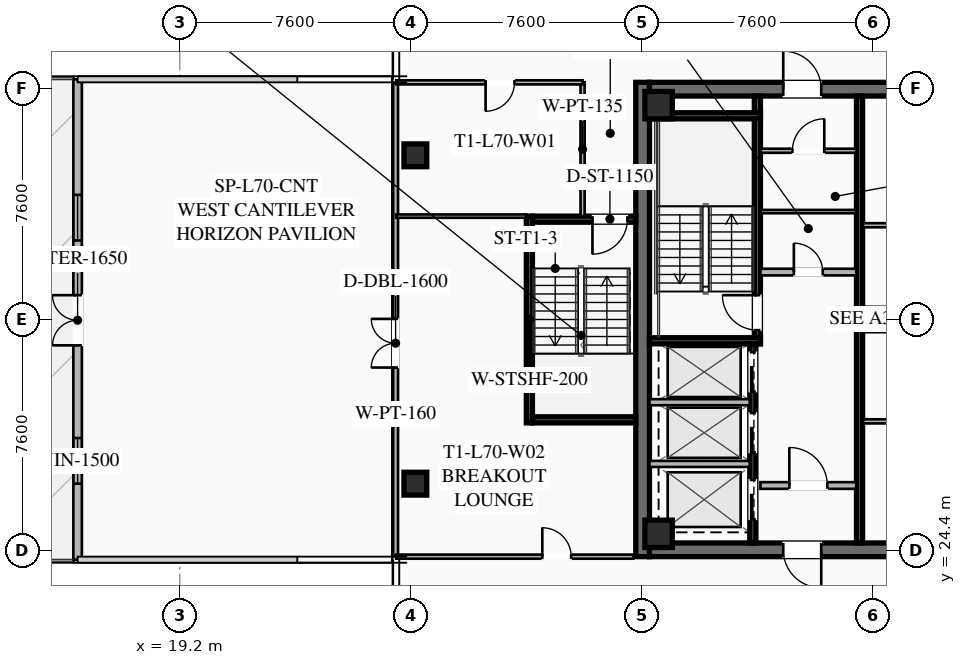
"""IFC4 building model, lengths in metres.
Left out: names, types, materials, properties, quantities, classifications, styles, units other than length and angle.
Written with IfcOpenShell. Run it as: python <this file> out.ifc"""

import sys

from ifc_helpers import new_model, si_unit, direction, frame, frame_2d, origin, origin_2d, place, context, subcontext, project, spatial, rectangle, hollow_rectangle, extrude, element, fill, save


model = new_model("IFC4")
c1 = context("Model", 3, precision=1e-05, world=origin(), true_north=direction((0.0, 1.0)))
c2 = subcontext(c1, "Body", "Model", "MODEL_VIEW")
j1 = project(units=[si_unit("LENGTHUNIT", "METRE"), si_unit("PLANEANGLEUNIT", "RADIAN")], contexts=[c1])
p1 = place(None, origin())
s1 = spatial("IfcSite", under=j1, at=p1, CompositionType="ELEMENT")
p2 = place(p1, origin())
s2 = spatial("IfcBuilding", under=s1, at=p2, CompositionType="ELEMENT")
p3 = place(p2, frame((0.0, 0.0, 259.4)))
s3 = spatial("IfcBuildingStorey", under=s2, at=p3, CompositionType="ELEMENT", Elevation=259.4)
p4 = place(p3, frame((34.425, 24.2, 0.0), z_axis=(0.0, 0.0, 1.0), x_axis=(0.0, 1.0, 0.0)))
e1 = element("IfcWall", 1, at=p4, inside=s3, PredefinedType="SHEAR", context=c2, shape_type="SweptSolid", body=[
    extrude(rectangle(XDim=15.6, YDim=0.45, at=frame_2d((7.8, 0.0))), origin(), (0.0, 0.0, 1.0), 4.0),
])
p5 = place(p3, frame((49.35, 24.425, 0.0), z_axis=(0.0, 0.0, 1.0), x_axis=(-1.0, 0.0, 0.0)))
e2 = element("IfcWall", 2, at=p5, inside=s3, PredefinedType="SHEAR", context=c2, shape_type="SweptSolid", body=[
    extrude(rectangle(XDim=14.7, YDim=0.45, at=frame_2d((7.35, 0.0))), origin(), (0.0, 0.0, 1.0), 4.0),
])
p6 = place(p5, frame((9.05, 0.0, 0.0)))
e3 = element("IfcOpeningElement", 3, at=p6, cuts=e2, PredefinedType="OPENING", context=c2, shape_type="SweptSolid", body=[
    extrude(rectangle(XDim=1.25, YDim=2.25, at=frame_2d((0.625, 1.125))), frame((0.0, 0.235, 0.0), z_axis=(0.0, -1.0, 0.0), x_axis=(1.0, 0.0, 0.0)), (0.0, 0.0, 1.0), 0.47),
])
p7 = place(p5, frame((4.0, 0.0, 0.0)))
e4 = element("IfcOpeningElement", 4, at=p7, cuts=e2, PredefinedType="OPENING", context=c2, shape_type="SweptSolid", body=[
    extrude(rectangle(XDim=1.25, YDim=2.25, at=frame_2d((0.625, 1.125))), frame((0.0, 0.235, 0.0), z_axis=(0.0, -1.0, 0.0), x_axis=(1.0, 0.0, 0.0)), (0.0, 0.0, 1.0), 0.47),
])
p8 = place(p3, frame((34.65, 39.575, 0.0), z_axis=(0.0, 0.0, 1.0), x_axis=(1.0, 0.0, 0.0)))
e5 = element("IfcWall", 5, at=p8, inside=s3, PredefinedType="SHEAR", context=c2, shape_type="SweptSolid", body=[
    extrude(rectangle(XDim=14.7, YDim=0.45, at=frame_2d((7.35, 0.0))), origin(), (0.0, 0.0, 1.0), 4.0),
])
p9 = place(p8, frame((4.4, 0.0, 0.0)))
e6 = element("IfcOpeningElement", 6, at=p9, cuts=e5, PredefinedType="OPENING", context=c2, shape_type="SweptSolid", body=[
    extrude(rectangle(XDim=1.25, YDim=2.25, at=frame_2d((0.625, 1.125))), frame((0.0, 0.235, 0.0), z_axis=(0.0, -1.0, 0.0), x_axis=(1.0, 0.0, 0.0)), (0.0, 0.0, 1.0), 0.47),
])
p10 = place(p8, frame((9.45, 0.0, 0.0)))
e7 = element("IfcOpeningElement", 7, at=p10, cuts=e5, PredefinedType="OPENING", context=c2, shape_type="SweptSolid", body=[
    extrude(rectangle(XDim=1.25, YDim=2.25, at=frame_2d((0.625, 1.125))), frame((0.0, 0.235, 0.0), z_axis=(0.0, -1.0, 0.0), x_axis=(1.0, 0.0, 0.0)), (0.0, 0.0, 1.0), 0.47),
])
for number, where, z_axis, x_axis in (
    (8, (34.95, 24.95, 0.0), (0.0, 0.0, 1.0), (1.0, 0.0, 0.0)),
    (9, (34.95, 39.05, 0.0), (0.0, 0.0, 1.0), (1.0, 0.0, 0.0)),
):
    element("IfcColumn", number, at=place(p3, frame(where, z_axis=z_axis, x_axis=x_axis)), inside=s3, PredefinedType="COLUMN", context=c2, shape_type="SweptSolid", body=[
        extrude(hollow_rectangle(XDim=0.9, YDim=0.9, WallThickness=0.04, at=origin_2d()), origin(), (0.0, 0.0, 1.0), 3.7),
    ])
for number, where, z_axis, x_axis in (
    (10, (26.95, 37.4, 0.0), (0.0, 0.0, 1.0), (1.0, 0.0, 0.0)),
    (11, (26.95, 26.6, 0.0), (0.0, 0.0, 1.0), (1.0, 0.0, 0.0)),
):
    element("IfcColumn", number, at=place(p3, frame(where, z_axis=z_axis, x_axis=x_axis)), inside=s3, PredefinedType="COLUMN", context=c2, shape_type="SweptSolid", body=[
        extrude(hollow_rectangle(XDim=0.75, YDim=0.75, WallThickness=0.032, at=origin_2d()), origin(), (0.0, 0.0, 1.0), 3.7),
    ])
p11 = place(p3, frame((15.84, 24.1, 0.0), z_axis=(0.0, 0.0, 1.0), x_axis=(0.0, 1.0, 0.0)))
e12 = element("IfcWall", 12, at=p11, inside=s3, PredefinedType="SOLIDWALL", context=c2, shape_type="SweptSolid", body=[
    extrude(rectangle(XDim=15.8, YDim=0.28, at=frame_2d((7.9, 0.0))), origin(), (0.0, 0.0, 1.0), 3.7),
])
p12 = place(p11, frame((7.05, 0.0, 0.0)))
e13 = element("IfcOpeningElement", 13, at=p12, cuts=e12, PredefinedType="OPENING", context=c2, shape_type="SweptSolid", body=[
    extrude(rectangle(XDim=1.65, YDim=2.2, at=frame_2d((0.825, 1.1))), frame((0.0, 0.15, 0.0), z_axis=(0.0, -1.0, 0.0), x_axis=(1.0, 0.0, 0.0)), (0.0, 0.0, 1.0), 0.3),
])
p13 = place(p11, frame((2.5, 0.0, 0.9)))
e14 = element("IfcOpeningElement", 14, at=p13, cuts=e12, PredefinedType="OPENING", context=c2, shape_type="SweptSolid", body=[
    extrude(rectangle(XDim=1.5, YDim=1.8, at=frame_2d((0.75, 0.9))), frame((0.0, 0.15, 0.0), z_axis=(0.0, -1.0, 0.0), x_axis=(1.0, 0.0, 0.0)), (0.0, 0.0, 1.0), 0.3),
])
p14 = place(p11, frame((10.5, 0.0, 0.9)))
e15 = element("IfcOpeningElement", 15, at=p14, cuts=e12, PredefinedType="OPENING", context=c2, shape_type="SweptSolid", body=[
    extrude(rectangle(XDim=1.5, YDim=1.8, at=frame_2d((0.75, 0.9))), frame((0.0, 0.15, 0.0), z_axis=(0.0, -1.0, 0.0), x_axis=(1.0, 0.0, 0.0)), (0.0, 0.0, 1.0), 0.3),
])
p15 = place(p3, frame((26.3, 24.22, 0.0), z_axis=(0.0, 0.0, 1.0), x_axis=(0.0, 1.0, 0.0)))
e16 = element("IfcWall", 16, at=p15, inside=s3, PredefinedType="PARTITIONING", context=c2, shape_type="SweptSolid", body=[
    extrude(rectangle(XDim=15.56, YDim=0.16, at=frame_2d((7.78, 0.0))), origin(), (0.0, 0.0, 1.0), 2.659),
])
p16 = place(p15, frame((6.2, 0.0, 0.0)))
e17 = element("IfcOpeningElement", 17, at=p16, cuts=e16, PredefinedType="OPENING", context=c2, shape_type="SweptSolid", body=[
    extrude(rectangle(XDim=1.6, YDim=2.25, at=frame_2d((0.8, 1.125))), frame((0.0, 0.09, 0.0), z_axis=(0.0, -1.0, 0.0), x_axis=(1.0, 0.0, 0.0)), (0.0, 0.0, 1.0), 0.18),
])
p17 = place(p3, frame((38.2, 31.2, 0.0), z_axis=(0.0, 0.0, 1.0), x_axis=(0.0, 1.0, 0.0)))
e18 = element("IfcWall", 18, at=p17, inside=s3, PredefinedType="SHEAR", context=c2, shape_type="SweptSolid", body=[
    extrude(rectangle(XDim=8.15, YDim=0.2, at=frame_2d((4.075, 0.0))), origin(), (0.0, 0.0, 1.0), 3.7),
])
p18 = place(p17, frame((0.45, 0.0, 0.0)))
e19 = element("IfcOpeningElement", 19, at=p18, cuts=e18, PredefinedType="OPENING", context=c2, shape_type="SweptSolid", body=[
    extrude(rectangle(XDim=1.15, YDim=2.2, at=frame_2d((0.575, 1.1))), frame((0.0, 0.11, 0.0), z_axis=(0.0, -1.0, 0.0), x_axis=(1.0, 0.0, 0.0)), (0.0, 0.0, 1.0), 0.22),
])
for number, where, z_axis, x_axis in (
    (20, (34.65, 31.3, 0.0), (0.0, 0.0, 1.0), (1.0, 0.0, 0.0)),
    (21, (34.65, 38.7, 0.0), (0.0, 0.0, 1.0), (1.0, 0.0, 0.0)),
):
    element("IfcWall", number, at=place(p3, frame(where, z_axis=z_axis, x_axis=x_axis)), inside=s3, PredefinedType="SHEAR", context=c2, shape_type="SweptSolid", body=[
        extrude(rectangle(XDim=3.65, YDim=0.2, at=frame_2d((1.825, 0.0))), origin(), (0.0, 0.0, 1.0), 3.7),
    ])
p19 = place(p3, frame((41.56, 24.65, 0.0), z_axis=(0.0, 0.0, 1.0), x_axis=(0.0, 1.0, 0.0)))
e22 = element("IfcWall", 22, at=p19, inside=s3, PredefinedType="SHEAR", context=c2, shape_type="SweptSolid", body=[
    extrude(rectangle(XDim=14.7, YDim=0.2, at=frame_2d((7.35, 0.0))), origin(), (0.0, 0.0, 1.0), 3.7),
])
p20 = place(p3, frame((38.3, 33.56, 0.0), z_axis=(0.0, 0.0, 1.0), x_axis=(1.0, 0.0, 0.0)))
e23 = element("IfcWall", 23, at=p20, inside=s3, PredefinedType="SOLIDWALL", context=c2, shape_type="SweptSolid", body=[
    extrude(rectangle(XDim=3.15, YDim=0.22, at=frame_2d((1.575, 0.0))), origin(), (0.0, 0.0, 1.0), 2.659),
])
p21 = place(p20, frame((1.1, 0.0, 0.0)))
e24 = element("IfcOpeningElement", 24, at=p21, cuts=e23, PredefinedType="OPENING", context=c2, shape_type="SweptSolid", body=[
    extrude(rectangle(XDim=0.95, YDim=2.05, at=frame_2d((0.475, 1.025))), frame((0.0, 0.12, 0.0), z_axis=(0.0, -1.0, 0.0), x_axis=(1.0, 0.0, 0.0)), (0.0, 0.0, 1.0), 0.24),
])
p22 = place(p3, frame((38.3, 26.54, 0.0), z_axis=(0.0, 0.0, 1.0), x_axis=(1.0, 0.0, 0.0)))
e25 = element("IfcWall", 25, at=p22, inside=s3, PredefinedType="SOLIDWALL", context=c2, shape_type="SweptSolid", body=[
    extrude(rectangle(XDim=3.15, YDim=0.22, at=frame_2d((1.575, 0.0))), origin(), (0.0, 0.0, 1.0), 2.659),
])
p23 = place(p22, frame((0.95, 0.0, 0.0)))
e26 = element("IfcOpeningElement", 26, at=p23, cuts=e25, PredefinedType="OPENING", context=c2, shape_type="SweptSolid", body=[
    extrude(rectangle(XDim=1.25, YDim=2.25, at=frame_2d((0.625, 1.125))), frame((0.0, 0.12, 0.0), z_axis=(0.0, -1.0, 0.0), x_axis=(1.0, 0.0, 0.0)), (0.0, 0.0, 1.0), 0.24),
])
p24 = place(p3, frame((38.05, 24.65, 0.0), z_axis=(0.0, 0.0, 1.0), x_axis=(0.0, 1.0, 0.0)))
e27 = element("IfcWall", 27, at=p24, inside=s3, PredefinedType="SHEAR", context=c2, shape_type="SweptSolid", body=[
    extrude(rectangle(XDim=6.55, YDim=0.2, at=frame_2d((3.275, 0.0))), origin(), (0.0, 0.0, 1.0), 3.7),
])
p25 = place(p24, frame((4.975, 0.0, 0.0)))
e28 = element("IfcOpeningElement", 28, at=p25, cuts=e27, PredefinedType="OPENING", context=c2, shape_type="SweptSolid", body=[
    extrude(rectangle(XDim=1.3, YDim=2.25, at=frame_2d((0.65, 1.125))), frame((0.0, 0.11, 0.0), z_axis=(0.0, -1.0, 0.0), x_axis=(1.0, 0.0, 0.0)), (0.0, 0.0, 1.0), 0.22),
])
p26 = place(p24, frame((2.975, 0.0, 0.0)))
e29 = element("IfcOpeningElement", 29, at=p26, cuts=e27, PredefinedType="OPENING", context=c2, shape_type="SweptSolid", body=[
    extrude(rectangle(XDim=1.3, YDim=2.25, at=frame_2d((0.65, 1.125))), frame((0.0, 0.11, 0.0), z_axis=(0.0, -1.0, 0.0), x_axis=(1.0, 0.0, 0.0)), (0.0, 0.0, 1.0), 0.22),
])
p27 = place(p24, frame((0.775, 0.0, 0.0)))
e30 = element("IfcOpeningElement", 30, at=p27, cuts=e27, PredefinedType="OPENING", context=c2, shape_type="SweptSolid", body=[
    extrude(rectangle(XDim=1.3, YDim=2.25, at=frame_2d((0.65, 1.125))), frame((0.0, 0.11, 0.0), z_axis=(0.0, -1.0, 0.0), x_axis=(1.0, 0.0, 0.0)), (0.0, 0.0, 1.0), 0.22),
])
for number, where, z_axis, x_axis in (
    (31, (34.65, 27.25, 0.0), (0.0, 0.0, 1.0), (1.0, 0.0, 0.0)),
    (32, (34.65, 29.28, 0.0), (0.0, 0.0, 1.0), (1.0, 0.0, 0.0)),
):
    element("IfcWall", number, at=place(p3, frame(where, z_axis=z_axis, x_axis=x_axis)), inside=s3, PredefinedType="SOLIDWALL", context=c2, shape_type="SweptSolid", body=[
        extrude(rectangle(XDim=3.3, YDim=0.2, at=frame_2d((1.65, 0.0))), origin(), (0.0, 0.0, 1.0), 3.7),
    ])
p28 = place(p3, frame((38.3, 37.55, 0.0), z_axis=(0.0, 0.0, 1.0), x_axis=(1.0, 0.0, 0.0)))
e33 = element("IfcWall", 33, at=p28, inside=s3, PredefinedType="PARTITIONING", context=c2, shape_type="SweptSolid", body=[
    extrude(rectangle(XDim=3.15, YDim=0.135, at=frame_2d((1.575, 0.0))), origin(), (0.0, 0.0, 1.0), 2.659),
])
p29 = place(p28, frame((1.05, 0.0, 0.0)))
e34 = element("IfcOpeningElement", 34, at=p29, cuts=e33, PredefinedType="OPENING", context=c2, shape_type="SweptSolid", body=[
    extrude(rectangle(XDim=1.05, YDim=2.2, at=frame_2d((0.525, 1.1))), frame((0.0, 0.077, 0.0), z_axis=(0.0, -1.0, 0.0), x_axis=(1.0, 0.0, 0.0)), (0.0, 0.0, 1.0), 0.155),
])
p30 = place(p3, frame((38.3, 35.55, 0.0), z_axis=(0.0, 0.0, 1.0), x_axis=(1.0, 0.0, 0.0)))
e35 = element("IfcWall", 35, at=p30, inside=s3, PredefinedType="PARTITIONING", context=c2, shape_type="SweptSolid", body=[
    extrude(rectangle(XDim=3.15, YDim=0.11, at=frame_2d((1.575, 0.0))), origin(), (0.0, 0.0, 1.0), 2.659),
])
for number, where, z_axis, x_axis in (
    (36, (41.67, 31.65, 0.0), (0.0, 0.0, 1.0), (1.0, 0.0, 0.0)),
    (37, (41.67, 28.65, 0.0), (0.0, 0.0, 1.0), (1.0, 0.0, 0.0)),
    (38, (41.67, 32.35, 0.0), (0.0, 0.0, 1.0), (1.0, 0.0, 0.0)),
    (39, (41.67, 35.1, 0.0), (0.0, 0.0, 1.0), (1.0, 0.0, 0.0)),
):
    element("IfcWall", number, at=place(p3, frame(where, z_axis=z_axis, x_axis=x_axis)), inside=s3, PredefinedType="PARTITIONING", context=c2, shape_type="SweptSolid", body=[
        extrude(rectangle(XDim=1.88, YDim=0.135, at=frame_2d((0.94, 0.0))), origin(), (0.0, 0.0, 1.0), 2.659),
    ])
p31 = place(p3, frame((30.7, 28.6, 0.0), z_axis=(0.0, 0.0, 1.0), x_axis=(0.0, 1.0, 0.0)))
e40 = element("IfcWall", 40, at=p31, inside=s3, PredefinedType="SHEAR", context=c2, shape_type="SweptSolid", body=[
    extrude(rectangle(XDim=6.8, YDim=0.2, at=frame_2d((3.4, 0.0))), origin(), (0.0, 0.0, 1.0), 3.7),
])
p32 = place(p3, frame((34.2, 35.3, 0.0), z_axis=(0.0, 0.0, 1.0), x_axis=(-1.0, 0.0, 0.0)))
e41 = element("IfcWall", 41, at=p32, inside=s3, PredefinedType="SHEAR", context=c2, shape_type="SweptSolid", body=[
    extrude(rectangle(XDim=3.4, YDim=0.2, at=frame_2d((1.7, 0.0))), origin(), (0.0, 0.0, 1.0), 3.7),
])
p33 = place(p32, frame((0.275, 0.0, 0.0)))
e42 = element("IfcOpeningElement", 42, at=p33, cuts=e41, PredefinedType="OPENING", context=c2, shape_type="SweptSolid", body=[
    extrude(rectangle(XDim=1.15, YDim=2.2, at=frame_2d((0.575, 1.1))), frame((0.0, 0.11, 0.0), z_axis=(0.0, -1.0, 0.0), x_axis=(1.0, 0.0, 0.0)), (0.0, 0.0, 1.0), 0.22),
])
p34 = place(p3, frame((30.8, 28.7, 0.0), z_axis=(0.0, 0.0, 1.0), x_axis=(1.0, 0.0, 0.0)))
e43 = element("IfcWall", 43, at=p34, inside=s3, PredefinedType="SHEAR", context=c2, shape_type="SweptSolid", body=[
    extrude(rectangle(XDim=3.4, YDim=0.2, at=frame_2d((1.7, 0.0))), origin(), (0.0, 0.0, 1.0), 3.7),
])
p35 = place(p3, frame((32.45, 35.4, 0.0), z_axis=(0.0, 0.0, 1.0), x_axis=(0.0, 1.0, 0.0)))
e44 = element("IfcWall", 44, at=p35, inside=s3, PredefinedType="PARTITIONING", context=c2, shape_type="SweptSolid", body=[
    extrude(rectangle(XDim=4.4, YDim=0.135, at=frame_2d((2.2, 0.0))), origin(), (0.0, 0.0, 1.0), 2.659),
])
p36 = place(p3, frame((32.45, 39.8, 0.0), z_axis=(0.0, 0.0, 1.0), x_axis=(-1.0, 0.0, 0.0)))
e45 = element("IfcWall", 45, at=p36, inside=s3, PredefinedType="PARTITIONING", context=c2, shape_type="SweptSolid", body=[
    extrude(rectangle(XDim=6.13, YDim=0.135, at=frame_2d((3.065, 0.0))), origin(), (0.0, 0.0, 1.0), 2.659),
])
p37 = place(p36, frame((2.24, 0.0, 0.0)))
e46 = element("IfcOpeningElement", 46, at=p37, cuts=e45, PredefinedType="OPENING", context=c2, shape_type="SweptSolid", body=[
    extrude(rectangle(XDim=0.95, YDim=2.05, at=frame_2d((0.475, 1.025))), frame((0.0, 0.077, 0.0), z_axis=(0.0, -1.0, 0.0), x_axis=(1.0, 0.0, 0.0)), (0.0, 0.0, 1.0), 0.155),
])
p38 = place(p3, frame((26.32, 24.2, 0.0), z_axis=(0.0, 0.0, 1.0), x_axis=(1.0, 0.0, 0.0)))
e47 = element("IfcWall", 47, at=p38, inside=s3, PredefinedType="PARTITIONING", context=c2, shape_type="SweptSolid", body=[
    extrude(rectangle(XDim=7.8, YDim=0.135, at=frame_2d((3.9, 0.0))), origin(), (0.0, 0.0, 1.0), 2.659),
])
p39 = place(p38, frame((4.805, 0.0, 0.0)))
e48 = element("IfcOpeningElement", 48, at=p39, cuts=e47, PredefinedType="OPENING", context=c2, shape_type="SweptSolid", body=[
    extrude(rectangle(XDim=0.95, YDim=2.05, at=frame_2d((0.475, 1.025))), frame((0.0, 0.077, 0.0), z_axis=(0.0, -1.0, 0.0), x_axis=(1.0, 0.0, 0.0)), (0.0, 0.0, 1.0), 0.155),
])
p40 = place(p3, frame((30.6, 35.4, 0.0), z_axis=(0.0, 0.0, 1.0), x_axis=(-1.0, 0.0, 0.0)))
e49 = element("IfcWall", 49, at=p40, inside=s3, PredefinedType="PARTITIONING", context=c2, shape_type="SweptSolid", body=[
    extrude(rectangle(XDim=4.28, YDim=0.11, at=frame_2d((2.14, 0.0))), origin(), (0.0, 0.0, 1.0), 2.659),
])
p41 = place(p12, origin())
e50 = element("IfcDoor", 50, at=p41, inside=s3, OperationType="DOUBLE_DOOR_SINGLE_SWING", PredefinedType="DOOR", context=c2, shape_type="SweptSolid", body=[
    extrude(rectangle(XDim=1.65, YDim=2.2, at=frame_2d((0.825, 1.1))), frame((0.0, 0.025, 0.0), z_axis=(0.0, -1.0, 0.0), x_axis=(1.0, 0.0, 0.0)), (0.0, 0.0, 1.0), 0.05),
])
fill(e13, e50)
p42 = place(p13, origin())
e51 = element("IfcWindow", 51, at=p42, inside=s3, PartitioningType="SINGLE_PANEL", PredefinedType="WINDOW", context=c2, shape_type="SweptSolid", body=[
    extrude(rectangle(XDim=1.5, YDim=1.8, at=frame_2d((0.75, 0.9))), frame((0.0, 0.03, 0.0), z_axis=(0.0, -1.0, 0.0), x_axis=(1.0, 0.0, 0.0)), (0.0, 0.0, 1.0), 0.06),
])
fill(e14, e51)
p43 = place(p14, origin())
e52 = element("IfcWindow", 52, at=p43, inside=s3, PartitioningType="SINGLE_PANEL", PredefinedType="WINDOW", context=c2, shape_type="SweptSolid", body=[
    extrude(rectangle(XDim=1.5, YDim=1.8, at=frame_2d((0.75, 0.9))), frame((0.0, 0.03, 0.0), z_axis=(0.0, -1.0, 0.0), x_axis=(1.0, 0.0, 0.0)), (0.0, 0.0, 1.0), 0.06),
])
fill(e15, e52)
p44 = place(p16, origin())
e53 = element("IfcDoor", 53, at=p44, inside=s3, OperationType="DOUBLE_DOOR_SINGLE_SWING", PredefinedType="DOOR", context=c2, shape_type="SweptSolid", body=[
    extrude(rectangle(XDim=1.6, YDim=2.25, at=frame_2d((0.8, 1.125))), frame((0.0, 0.025, 0.0), z_axis=(0.0, -1.0, 0.0), x_axis=(1.0, 0.0, 0.0)), (0.0, 0.0, 1.0), 0.05),
])
fill(e17, e53)
p45 = place(p9, origin())
e54 = element("IfcDoor", 54, at=p45, inside=s3, OperationType="SINGLE_SWING_LEFT", PredefinedType="DOOR", context=c2, shape_type="SweptSolid", body=[
    extrude(rectangle(XDim=1.25, YDim=2.25, at=frame_2d((0.625, 1.125))), frame((0.0, 0.025, 0.0), z_axis=(0.0, -1.0, 0.0), x_axis=(1.0, 0.0, 0.0)), (0.0, 0.0, 1.0), 0.05),
])
fill(e6, e54)
p46 = place(p6, origin())
e55 = element("IfcDoor", 55, at=p46, inside=s3, OperationType="SINGLE_SWING_LEFT", PredefinedType="DOOR", context=c2, shape_type="SweptSolid", body=[
    extrude(rectangle(XDim=1.25, YDim=2.25, at=frame_2d((0.625, 1.125))), frame((0.0, 0.025, 0.0), z_axis=(0.0, -1.0, 0.0), x_axis=(1.0, 0.0, 0.0)), (0.0, 0.0, 1.0), 0.05),
])
fill(e3, e55)
p47 = place(p18, origin())
e56 = element("IfcDoor", 56, at=p47, inside=s3, OperationType="SINGLE_SWING_RIGHT", PredefinedType="DOOR", context=c2, shape_type="SweptSolid", body=[
    extrude(rectangle(XDim=1.15, YDim=2.2, at=frame_2d((0.575, 1.1))), frame((0.0, 0.025, 0.0), z_axis=(0.0, -1.0, 0.0), x_axis=(1.0, 0.0, 0.0)), (0.0, 0.0, 1.0), 0.05),
])
fill(e19, e56)
p48 = place(p23, origin())
e57 = element("IfcDoor", 57, at=p48, inside=s3, OperationType="SINGLE_SWING_LEFT", PredefinedType="DOOR", context=c2, shape_type="SweptSolid", body=[
    extrude(rectangle(XDim=1.25, YDim=2.25, at=frame_2d((0.625, 1.125))), frame((0.0, 0.025, 0.0), z_axis=(0.0, -1.0, 0.0), x_axis=(1.0, 0.0, 0.0)), (0.0, 0.0, 1.0), 0.05),
])
fill(e26, e57)
p49 = place(p29, origin())
e58 = element("IfcDoor", 58, at=p49, inside=s3, OperationType="SINGLE_SWING_RIGHT", PredefinedType="DOOR", context=c2, shape_type="SweptSolid", body=[
    extrude(rectangle(XDim=1.05, YDim=2.2, at=frame_2d((0.525, 1.1))), frame((0.0, 0.025, 0.0), z_axis=(0.0, -1.0, 0.0), x_axis=(1.0, 0.0, 0.0)), (0.0, 0.0, 1.0), 0.05),
])
fill(e34, e58)
p50 = place(p21, origin())
e59 = element("IfcDoor", 59, at=p50, inside=s3, OperationType="SINGLE_SWING_LEFT", PredefinedType="DOOR", context=c2, shape_type="SweptSolid", body=[
    extrude(rectangle(XDim=0.95, YDim=2.05, at=frame_2d((0.475, 1.025))), frame((0.0, 0.025, 0.0), z_axis=(0.0, -1.0, 0.0), x_axis=(1.0, 0.0, 0.0)), (0.0, 0.0, 1.0), 0.05),
])
fill(e24, e59)
p51 = place(p33, origin())
e60 = element("IfcDoor", 60, at=p51, inside=s3, OperationType="SINGLE_SWING_RIGHT", PredefinedType="DOOR", context=c2, shape_type="SweptSolid", body=[
    extrude(rectangle(XDim=1.15, YDim=2.2, at=frame_2d((0.575, 1.1))), frame((0.0, 0.025, 0.0), z_axis=(0.0, -1.0, 0.0), x_axis=(1.0, 0.0, 0.0)), (0.0, 0.0, 1.0), 0.05),
])
fill(e42, e60)
p52 = place(p37, origin())
e61 = element("IfcDoor", 61, at=p52, inside=s3, OperationType="SINGLE_SWING_RIGHT", PredefinedType="DOOR", context=c2, shape_type="SweptSolid", body=[
    extrude(rectangle(XDim=0.95, YDim=2.05, at=frame_2d((0.475, 1.025))), frame((0.0, 0.025, 0.0), z_axis=(0.0, -1.0, 0.0), x_axis=(1.0, 0.0, 0.0)), (0.0, 0.0, 1.0), 0.05),
])
fill(e46, e61)
p53 = place(p39, origin())
e62 = element("IfcDoor", 62, at=p53, inside=s3, OperationType="SINGLE_SWING_LEFT", PredefinedType="DOOR", context=c2, shape_type="SweptSolid", body=[
    extrude(rectangle(XDim=0.95, YDim=2.05, at=frame_2d((0.475, 1.025))), frame((0.0, 0.025, 0.0), z_axis=(0.0, -1.0, 0.0), x_axis=(1.0, 0.0, 0.0)), (0.0, 0.0, 1.0), 0.05),
])
fill(e48, e62)
p54 = place(p25, origin())
e63 = element("IfcDoor", 63, at=p54, inside=s3, OperationType="SLIDING_TO_LEFT", PredefinedType="DOOR", context=c2, shape_type="SweptSolid", body=[
    extrude(rectangle(XDim=1.3, YDim=2.25, at=frame_2d((0.65, 1.125))), frame((0.0, 0.025, 0.0), z_axis=(0.0, -1.0, 0.0), x_axis=(1.0, 0.0, 0.0)), (0.0, 0.0, 1.0), 0.05),
])
fill(e28, e63)
p55 = place(p26, origin())
e64 = element("IfcDoor", 64, at=p55, inside=s3, OperationType="SLIDING_TO_LEFT", PredefinedType="DOOR", context=c2, shape_type="SweptSolid", body=[
    extrude(rectangle(XDim=1.3, YDim=2.25, at=frame_2d((0.65, 1.125))), frame((0.0, 0.025, 0.0), z_axis=(0.0, -1.0, 0.0), x_axis=(1.0, 0.0, 0.0)), (0.0, 0.0, 1.0), 0.05),
])
fill(e29, e64)
p56 = place(p27, origin())
e65 = element("IfcDoor", 65, at=p56, inside=s3, OperationType="SLIDING_TO_LEFT", PredefinedType="DOOR", context=c2, shape_type="SweptSolid", body=[
    extrude(rectangle(XDim=1.3, YDim=2.25, at=frame_2d((0.65, 1.125))), frame((0.0, 0.025, 0.0), z_axis=(0.0, -1.0, 0.0), x_axis=(1.0, 0.0, 0.0)), (0.0, 0.0, 1.0), 0.05),
])
fill(e30, e65)
save(model, sys.argv[1])
